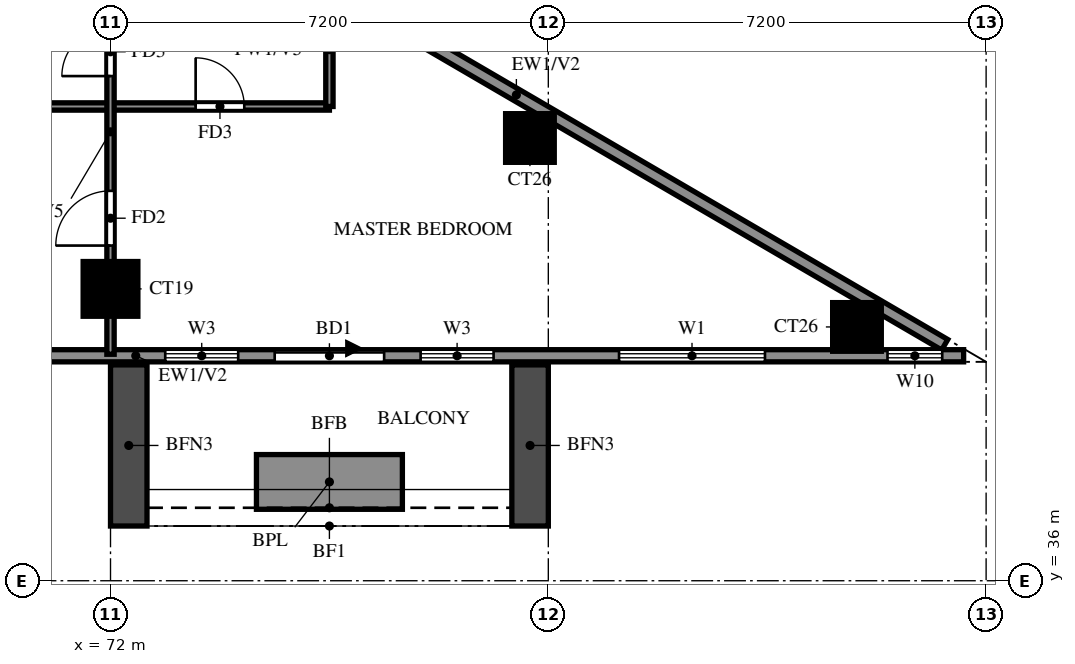
"""IFC4 building model, lengths in metres.
Left out: names, types, materials, properties, quantities, classifications, styles, units other than length and angle.
Written with IfcOpenShell. Run it as: python <this file> out.ifc"""

import sys

from ifc_helpers import new_model, si_unit, direction, frame, frame_2d, origin, origin_2d, place, context, subcontext, project, spatial, rectangle, extrude, source, transform, mapped, element, fill, save


model = new_model("IFC4")
c1 = context("Model", 3, precision=1e-05, world=origin(), true_north=direction((0.0, 1.0)))
c2 = subcontext(c1, "Body", "Model", "MODEL_VIEW")
j1 = project(units=[si_unit("LENGTHUNIT", "METRE"), si_unit("PLANEANGLEUNIT", "RADIAN")], contexts=[c1])
p1 = place(None, origin())
s1 = spatial("IfcSite", under=j1, at=p1, CompositionType="ELEMENT")
p2 = place(p1, origin())
s2 = spatial("IfcBuilding", under=s1, at=p2, CompositionType="ELEMENT")
p3 = place(p2, frame((0.0, 0.0, 178.0)))
s3 = spatial("IfcBuildingStorey", under=s2, at=p3, CompositionType="ELEMENT", Elevation=178.0)
m1 = source(origin(), c2, "Body", "SweptSolid", [
    extrude(rectangle(XDim=0.8, YDim=0.8, at=origin_2d()), origin(), (0.0, 0.0, 1.0), 3.2),
])
p4 = place(p3, frame((84.276, 40.174, 0.0), z_axis=(0.0, 0.0, 1.0), x_axis=(1.0, 0.0, 0.0)))
e1 = element("IfcColumn", 1, at=p4, inside=s3, PredefinedType="COLUMN", context=c2, shape_type="MappedRepresentation", body=[
    mapped(m1, transform((0.0, 0.0, 0.0))),
])
m2 = source(origin(), c2, "Body", "SweptSolid", [
    extrude(rectangle(XDim=0.9, YDim=0.9, at=origin_2d()), origin(), (0.0, 0.0, 1.0), 3.2),
])
p5 = place(p3, frame((72.0, 40.8, 0.0), z_axis=(0.0, 0.0, 1.0), x_axis=(1.0, 0.0, 0.0)))
e2 = element("IfcColumn", 2, at=p5, inside=s3, PredefinedType="COLUMN", context=c2, shape_type="MappedRepresentation", body=[
    mapped(m2, transform((0.0, 0.0, 0.0))),
])
p6 = place(p3, frame((78.898, 43.282, 0.0), z_axis=(0.0, 0.0, 1.0), x_axis=(1.0, 0.0, 0.0)))
e3 = element("IfcColumn", 3, at=p6, inside=s3, PredefinedType="COLUMN", context=c2, shape_type="MappedRepresentation", body=[
    mapped(m1, transform((0.0, 0.0, 0.0))),
])
p7 = place(p3, frame((85.719, 39.881, 0.0), z_axis=(0.0, 0.0, 1.0), x_axis=(-0.86377618652, 0.503875678716, 0.0)))
e4 = element("IfcWall", 4, at=p7, inside=s3, PredefinedType="SOLIDWALL", context=c2, shape_type="SweptSolid", body=[
    extrude(rectangle(XDim=16.311, YDim=0.2, at=frame_2d((8.156, 0.0))), origin(), (0.0, 0.0, 1.0), 3.2),
])
p8 = place(p7, frame((13.326, 0.0, 1.5)))
e5 = element("IfcOpeningElement", 5, at=p8, cuts=e4, PredefinedType="OPENING", context=c2, shape_type="SweptSolid", body=[
    extrude(rectangle(XDim=0.9, YDim=0.9, at=frame_2d((0.45, 0.45))), frame((0.0, 0.11, 0.0), z_axis=(0.0, -1.0, 0.0), x_axis=(1.0, 0.0, 0.0)), (0.0, 0.0, 1.0), 0.22),
])
p9 = place(p3, frame((58.8, 39.7, 0.0), z_axis=(0.0, 0.0, 1.0), x_axis=(1.0, 0.0, 0.0)))
e6 = element("IfcWall", 6, at=p9, inside=s3, PredefinedType="SOLIDWALL", context=c2, shape_type="SweptSolid", body=[
    extrude(rectangle(XDim=27.23, YDim=0.2, at=frame_2d((13.615, 0.0))), origin(), (0.0, 0.0, 1.0), 3.2),
])
p10 = place(p9, frame((15.9, 0.0, 0.0)))
e7 = element("IfcOpeningElement", 7, at=p10, cuts=e6, PredefinedType="OPENING", context=c2, shape_type="SweptSolid", body=[
    extrude(rectangle(XDim=1.8, YDim=2.4, at=frame_2d((0.9, 1.2))), frame((0.0, 0.11, 0.0), z_axis=(0.0, -1.0, 0.0), x_axis=(1.0, 0.0, 0.0)), (0.0, 0.0, 1.0), 0.22),
])
p11 = place(p9, frame((2.433, 0.0, 0.6)))
e8 = element("IfcOpeningElement", 8, at=p11, cuts=e6, PredefinedType="OPENING", context=c2, shape_type="SweptSolid", body=[
    extrude(rectangle(XDim=2.4, YDim=2.4, at=frame_2d((1.2, 1.2))), frame((0.0, 0.11, 0.0), z_axis=(0.0, -1.0, 0.0), x_axis=(1.0, 0.0, 0.0)), (0.0, 0.0, 1.0), 0.22),
])
p12 = place(p9, frame((5.967, 0.0, 0.6)))
e9 = element("IfcOpeningElement", 9, at=p12, cuts=e6, PredefinedType="OPENING", context=c2, shape_type="SweptSolid", body=[
    extrude(rectangle(XDim=2.4, YDim=2.4, at=frame_2d((1.2, 1.2))), frame((0.0, 0.11, 0.0), z_axis=(0.0, -1.0, 0.0), x_axis=(1.0, 0.0, 0.0)), (0.0, 0.0, 1.0), 0.22),
])
p13 = place(p9, frame((14.1, 0.0, 0.6)))
e10 = element("IfcOpeningElement", 10, at=p13, cuts=e6, PredefinedType="OPENING", context=c2, shape_type="SweptSolid", body=[
    extrude(rectangle(XDim=1.2, YDim=2.4, at=frame_2d((0.6, 1.2))), frame((0.0, 0.11, 0.0), z_axis=(0.0, -1.0, 0.0), x_axis=(1.0, 0.0, 0.0)), (0.0, 0.0, 1.0), 0.22),
])
p14 = place(p9, frame((18.3, 0.0, 0.6)))
e11 = element("IfcOpeningElement", 11, at=p14, cuts=e6, PredefinedType="OPENING", context=c2, shape_type="SweptSolid", body=[
    extrude(rectangle(XDim=1.2, YDim=2.4, at=frame_2d((0.6, 1.2))), frame((0.0, 0.11, 0.0), z_axis=(0.0, -1.0, 0.0), x_axis=(1.0, 0.0, 0.0)), (0.0, 0.0, 1.0), 0.22),
])
p15 = place(p9, frame((21.563, 0.0, 0.6)))
e12 = element("IfcOpeningElement", 12, at=p15, cuts=e6, PredefinedType="OPENING", context=c2, shape_type="SweptSolid", body=[
    extrude(rectangle(XDim=2.4, YDim=2.4, at=frame_2d((1.2, 1.2))), frame((0.0, 0.11, 0.0), z_axis=(0.0, -1.0, 0.0), x_axis=(1.0, 0.0, 0.0)), (0.0, 0.0, 1.0), 0.22),
])
p16 = place(p9, frame((25.978, 0.0, 0.6)))
e13 = element("IfcOpeningElement", 13, at=p16, cuts=e6, PredefinedType="OPENING", context=c2, shape_type="SweptSolid", body=[
    extrude(rectangle(XDim=0.9, YDim=2.4, at=frame_2d((0.45, 1.2))), frame((0.0, 0.11, 0.0), z_axis=(0.0, -1.0, 0.0), x_axis=(1.0, 0.0, 0.0)), (0.0, 0.0, 1.0), 0.22),
])
for number, where, z_axis, x_axis in (
    (14, (72.3, 39.55, 0.0), (0.0, 0.0, 1.0), (0.0, -1.0, 0.0)),
    (15, (78.9, 39.55, 0.0), (0.0, 0.0, 1.0), (0.0, -1.0, 0.0)),
):
    element("IfcWall", number, at=place(p3, frame(where, z_axis=z_axis, x_axis=x_axis)), inside=s3, PredefinedType="SOLIDWALL", context=c2, shape_type="SweptSolid", body=[
        extrude(rectangle(XDim=2.65, YDim=0.6, at=frame_2d((1.325, 0.0))), origin(), (0.0, 0.0, 1.0), 2.85),
    ])
p17 = place(p3, frame((74.4, 37.625, 0.0), z_axis=(0.0, 0.0, 1.0), x_axis=(1.0, 0.0, 0.0)))
e16 = element("IfcWall", 16, at=p17, inside=s3, PredefinedType="SOLIDWALL", context=c2, shape_type="SweptSolid", body=[
    extrude(rectangle(XDim=2.4, YDim=0.9, at=frame_2d((1.2, 0.0))), origin(), (0.0, 0.0, 1.0), 0.9),
])
p18 = place(p3, frame((60.0, 43.8, 0.0), z_axis=(0.0, 0.0, 1.0), x_axis=(1.0, 0.0, 0.0)))
e17 = element("IfcWall", 17, at=p18, inside=s3, PredefinedType="PARTITIONING", context=c2, shape_type="SweptSolid", body=[
    extrude(rectangle(XDim=15.6, YDim=0.12, at=frame_2d((7.8, 0.0))), origin(), (0.0, 0.0, 1.0), 3.2),
])
p19 = place(p18, frame((9.75, 0.0, 0.0)))
e18 = element("IfcOpeningElement", 18, at=p19, cuts=e17, PredefinedType="OPENING", context=c2, shape_type="SweptSolid", body=[
    extrude(rectangle(XDim=0.9, YDim=2.1, at=frame_2d((0.45, 1.05))), frame((0.0, 0.07, 0.0), z_axis=(0.0, -1.0, 0.0), x_axis=(1.0, 0.0, 0.0)), (0.0, 0.0, 1.0), 0.14),
])
p20 = place(p18, frame((3.45, 0.0, 0.0)))
e19 = element("IfcOpeningElement", 19, at=p20, cuts=e17, PredefinedType="OPENING", context=c2, shape_type="SweptSolid", body=[
    extrude(rectangle(XDim=1.5, YDim=2.1, at=frame_2d((0.75, 1.05))), frame((0.0, 0.07, 0.0), z_axis=(0.0, -1.0, 0.0), x_axis=(1.0, 0.0, 0.0)), (0.0, 0.0, 1.0), 0.14),
])
p21 = place(p18, frame((13.4, 0.0, 0.0)))
e20 = element("IfcOpeningElement", 20, at=p21, cuts=e17, PredefinedType="OPENING", context=c2, shape_type="SweptSolid", body=[
    extrude(rectangle(XDim=0.8, YDim=2.1, at=frame_2d((0.4, 1.05))), frame((0.0, 0.07, 0.0), z_axis=(0.0, -1.0, 0.0), x_axis=(1.0, 0.0, 0.0)), (0.0, 0.0, 1.0), 0.14),
])
p22 = place(p3, frame((72.0, 39.725, 0.0), z_axis=(0.0, 0.0, 1.0), x_axis=(0.0, 1.0, 0.0)))
e21 = element("IfcWall", 21, at=p22, inside=s3, PredefinedType="PARTITIONING", context=c2, shape_type="SweptSolid", body=[
    extrude(rectangle(XDim=8.13, YDim=0.12, at=frame_2d((4.065, 0.0))), origin(), (0.0, 0.0, 1.0), 2.3),
])
p23 = place(p22, frame((1.788, 0.0, 0.0)))
e22 = element("IfcOpeningElement", 22, at=p23, cuts=e21, PredefinedType="OPENING", context=c2, shape_type="SweptSolid", body=[
    extrude(rectangle(XDim=0.9, YDim=2.1, at=frame_2d((0.45, 1.05))), frame((0.0, 0.07, 0.0), z_axis=(0.0, -1.0, 0.0), x_axis=(1.0, 0.0, 0.0)), (0.0, 0.0, 1.0), 0.14),
])
p24 = place(p22, frame((4.575, 0.0, 0.0)))
e23 = element("IfcOpeningElement", 23, at=p24, cuts=e21, PredefinedType="OPENING", context=c2, shape_type="SweptSolid", body=[
    extrude(rectangle(XDim=0.8, YDim=2.1, at=frame_2d((0.4, 1.05))), frame((0.0, 0.07, 0.0), z_axis=(0.0, -1.0, 0.0), x_axis=(1.0, 0.0, 0.0)), (0.0, 0.0, 1.0), 0.14),
])
p25 = place(p3, frame((75.6, 43.8, 0.0), z_axis=(0.0, 0.0, 1.0), x_axis=(0.0, 1.0, 0.0)))
e24 = element("IfcWall", 24, at=p25, inside=s3, PredefinedType="PARTITIONING", context=c2, shape_type="SweptSolid", body=[
    extrude(rectangle(XDim=1.868, YDim=0.12, at=frame_2d((0.934, 0.0))), origin(), (0.0, 0.0, 1.0), 2.3),
])
p26 = place(p10, origin())
e25 = element("IfcDoor", 25, at=p26, inside=s3, OperationType="DOUBLE_DOOR_SLIDING", PredefinedType="DOOR", context=c2, shape_type="SweptSolid", body=[
    extrude(rectangle(XDim=1.8, YDim=2.4, at=frame_2d((0.9, 1.2))), frame((0.0, 0.025, 0.0), z_axis=(0.0, -1.0, 0.0), x_axis=(1.0, 0.0, 0.0)), (0.0, 0.0, 1.0), 0.05),
])
fill(e7, e25)
p27 = place(p13, origin())
e26 = element("IfcWindow", 26, at=p27, inside=s3, PartitioningType="SINGLE_PANEL", PredefinedType="WINDOW", context=c2, shape_type="SweptSolid", body=[
    extrude(rectangle(XDim=1.2, YDim=2.4, at=frame_2d((0.6, 1.2))), frame((0.0, 0.03, 0.0), z_axis=(0.0, -1.0, 0.0), x_axis=(1.0, 0.0, 0.0)), (0.0, 0.0, 1.0), 0.06),
])
fill(e10, e26)
p28 = place(p14, origin())
e27 = element("IfcWindow", 27, at=p28, inside=s3, PartitioningType="SINGLE_PANEL", PredefinedType="WINDOW", context=c2, shape_type="SweptSolid", body=[
    extrude(rectangle(XDim=1.2, YDim=2.4, at=frame_2d((0.6, 1.2))), frame((0.0, 0.03, 0.0), z_axis=(0.0, -1.0, 0.0), x_axis=(1.0, 0.0, 0.0)), (0.0, 0.0, 1.0), 0.06),
])
fill(e11, e27)
p29 = place(p15, origin())
e28 = element("IfcWindow", 28, at=p29, inside=s3, PartitioningType="DOUBLE_PANEL_VERTICAL", PredefinedType="WINDOW", context=c2, shape_type="SweptSolid", body=[
    extrude(rectangle(XDim=2.4, YDim=2.4, at=frame_2d((1.2, 1.2))), frame((0.0, 0.03, 0.0), z_axis=(0.0, -1.0, 0.0), x_axis=(1.0, 0.0, 0.0)), (0.0, 0.0, 1.0), 0.06),
])
fill(e12, e28)
p30 = place(p16, origin())
e29 = element("IfcWindow", 29, at=p30, inside=s3, PartitioningType="SINGLE_PANEL", PredefinedType="WINDOW", context=c2, shape_type="SweptSolid", body=[
    extrude(rectangle(XDim=0.9, YDim=2.4, at=frame_2d((0.45, 1.2))), frame((0.0, 0.03, 0.0), z_axis=(0.0, -1.0, 0.0), x_axis=(1.0, 0.0, 0.0)), (0.0, 0.0, 1.0), 0.06),
])
fill(e13, e29)
p31 = place(p23, origin())
e30 = element("IfcDoor", 30, at=p31, inside=s3, OperationType="SINGLE_SWING_LEFT", PredefinedType="DOOR", context=c2, shape_type="SweptSolid", body=[
    extrude(rectangle(XDim=0.9, YDim=2.1, at=frame_2d((0.45, 1.05))), frame((0.0, 0.025, 0.0), z_axis=(0.0, -1.0, 0.0), x_axis=(1.0, 0.0, 0.0)), (0.0, 0.0, 1.0), 0.05),
])
fill(e22, e30)
p32 = place(p24, origin())
e31 = element("IfcDoor", 31, at=p32, inside=s3, OperationType="SINGLE_SWING_LEFT", PredefinedType="DOOR", context=c2, shape_type="SweptSolid", body=[
    extrude(rectangle(XDim=0.8, YDim=2.1, at=frame_2d((0.4, 1.05))), frame((0.0, 0.025, 0.0), z_axis=(0.0, -1.0, 0.0), x_axis=(1.0, 0.0, 0.0)), (0.0, 0.0, 1.0), 0.05),
])
fill(e23, e31)
p33 = place(p21, origin())
e32 = element("IfcDoor", 32, at=p33, inside=s3, OperationType="SINGLE_SWING_LEFT", PredefinedType="DOOR", context=c2, shape_type="SweptSolid", body=[
    extrude(rectangle(XDim=0.8, YDim=2.1, at=frame_2d((0.4, 1.05))), frame((0.0, 0.025, 0.0), z_axis=(0.0, -1.0, 0.0), x_axis=(1.0, 0.0, 0.0)), (0.0, 0.0, 1.0), 0.05),
])
fill(e20, e32)
save(model, sys.argv[1])
